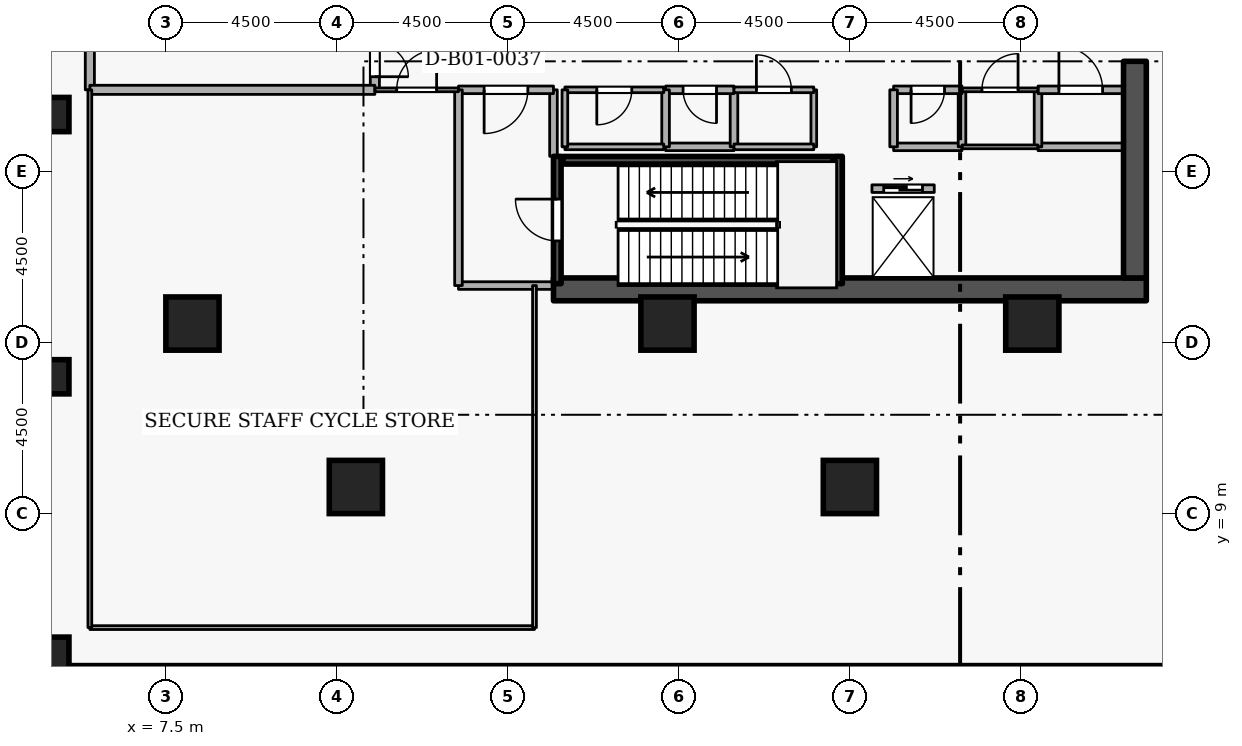
"""IFC4 building model, lengths in metres.
Left out: names, types, materials, properties, quantities, classifications, styles, units other than length and angle.
Written with IfcOpenShell. Run it as: python <this file> out.ifc"""

import sys

from ifc_helpers import new_model, si_unit, direction, frame, frame_2d, origin, origin_2d, place, context, subcontext, project, spatial, rectangle, extrude, element, fill, save


model = new_model("IFC4")
c1 = context("Model", 3, precision=1e-05, world=origin(), true_north=direction((0.0, 1.0)))
c2 = subcontext(c1, "Body", "Model", "MODEL_VIEW")
j1 = project(units=[si_unit("LENGTHUNIT", "METRE"), si_unit("PLANEANGLEUNIT", "RADIAN")], contexts=[c1])
p1 = place(None, origin())
s1 = spatial("IfcSite", under=j1, at=p1, CompositionType="ELEMENT")
p2 = place(p1, origin())
s2 = spatial("IfcBuilding", under=s1, at=p2, CompositionType="ELEMENT")
p3 = place(p2, frame((0.0, 0.0, -5.4)))
s3 = spatial("IfcBuildingStorey", under=s2, at=p3, CompositionType="ELEMENT", Elevation=-5.4)
p4 = place(p3, frame((17.7, 14.9, -0.6), z_axis=(0.0, 0.0, 1.0), x_axis=(1.0, 0.0, 0.0)))
e1 = element("IfcWall", 1, at=p4, inside=s3, PredefinedType="SHEAR", context=c2, shape_type="SweptSolid", body=[
    extrude(rectangle(XDim=15.6, YDim=0.6, at=frame_2d((7.8, 0.0))), origin(), (0.0, 0.0, 1.0), 6.0),
])
p5 = place(p3, frame((33.0, 15.2, -0.6), z_axis=(0.0, 0.0, 1.0), x_axis=(0.0, 1.0, 0.0)))
e2 = element("IfcWall", 2, at=p5, inside=s3, PredefinedType="SHEAR", context=c2, shape_type="SweptSolid", body=[
    extrude(rectangle(XDim=5.7, YDim=0.6, at=frame_2d((2.85, 0.0))), origin(), (0.0, 0.0, 1.0), 6.0),
])
for number, where, z_axis, x_axis in (
    (3, (12.5, 9.7, -0.6), (0.0, 0.0, 1.0), (1.0, 0.0, 0.0)),
    (4, (25.5, 9.7, -0.6), (0.0, 0.0, 1.0), (1.0, 0.0, 0.0)),
    (5, (8.2, 14.0, -0.6), (0.0, 0.0, 1.0), (1.0, 0.0, 0.0)),
    (6, (20.7, 14.0, -0.6), (0.0, 0.0, 1.0), (1.0, 0.0, 0.0)),
    (7, (30.3, 14.0, -0.6), (0.0, 0.0, 1.0), (1.0, 0.0, 0.0)),
):
    element("IfcColumn", number, at=place(p3, frame(where, z_axis=z_axis, x_axis=x_axis)), inside=s3, PredefinedType="COLUMN", context=c2, shape_type="SweptSolid", body=[
        extrude(rectangle(XDim=1.4, YDim=1.4, at=origin_2d()), origin(), (0.0, 0.0, 1.0), 6.0),
    ])
for number, where, z_axis, x_axis in (
    (8, (4.5, 5.3, -0.6), (0.0, 0.0, 1.0), (1.0, 0.0, 0.0)),
    (9, (4.5, 12.6, -0.6), (0.0, 0.0, 1.0), (1.0, 0.0, 0.0)),
    (10, (4.5, 19.5, -0.6), (0.0, 0.0, 1.0), (1.0, 0.0, 0.0)),
):
    element("IfcColumn", number, at=place(p3, frame(where, z_axis=z_axis, x_axis=x_axis)), inside=s3, PredefinedType="COLUMN", context=c2, shape_type="SweptSolid", body=[
        extrude(rectangle(XDim=0.9, YDim=0.9, at=origin_2d()), origin(), (0.0, 0.0, 1.0), 6.0),
    ])
p6 = place(p3, frame((26.08, 17.55, 0.0), z_axis=(0.0, 0.0, 1.0), x_axis=(1.0, 0.0, 0.0)))
e11 = element("IfcWall", 11, at=p6, inside=s3, PredefinedType="STANDARD", context=c2, shape_type="SweptSolid", body=[
    extrude(rectangle(XDim=1.64, YDim=0.2, at=frame_2d((0.82, 0.0))), origin(), (0.0, 0.0, 1.0), 5.06),
])
p7 = place(p6, frame((0.31, 0.0, 0.0)))
e12 = element("IfcOpeningElement", 12, at=p7, cuts=e11, PredefinedType="OPENING", context=c2, shape_type="SweptSolid", body=[
    extrude(rectangle(XDim=1.02, YDim=2.06, at=frame_2d((0.51, 1.03))), frame((0.0, 0.11, 0.0), z_axis=(0.0, -1.0, 0.0), x_axis=(1.0, 0.0, 0.0)), (0.0, 0.0, 1.0), 0.22),
])
p8 = place(p3, frame((17.8, 15.05, -0.6), z_axis=(0.0, 0.0, 1.0), x_axis=(0.0, 1.0, 0.0)))
e13 = element("IfcWall", 13, at=p8, inside=s3, PredefinedType="SHEAR", context=c2, shape_type="SweptSolid", body=[
    extrude(rectangle(XDim=3.35, YDim=0.2, at=frame_2d((1.675, 0.0))), origin(), (0.0, 0.0, 1.0), 6.0),
])
p9 = place(p8, frame((1.125, 0.0, 0.6)))
e14 = element("IfcOpeningElement", 14, at=p9, cuts=e13, PredefinedType="OPENING", context=c2, shape_type="SweptSolid", body=[
    extrude(rectangle(XDim=1.1, YDim=2.1, at=frame_2d((0.55, 1.05))), frame((0.0, 0.11, 0.0), z_axis=(0.0, -1.0, 0.0), x_axis=(1.0, 0.0, 0.0)), (0.0, 0.0, 1.0), 0.22),
])
p10 = place(p3, frame((25.2, 18.4, -0.6), z_axis=(0.0, 0.0, 1.0), x_axis=(0.0, -1.0, 0.0)))
e15 = element("IfcWall", 15, at=p10, inside=s3, PredefinedType="SHEAR", context=c2, shape_type="SweptSolid", body=[
    extrude(rectangle(XDim=3.35, YDim=0.2, at=frame_2d((1.675, 0.0))), origin(), (0.0, 0.0, 1.0), 6.0),
])
p11 = place(p3, frame((25.05, 18.297, -0.6), z_axis=(0.0, 0.0, 1.0), x_axis=(-1.0, 0.0, 0.0)))
e16 = element("IfcWall", 16, at=p11, inside=s3, PredefinedType="SHEAR", context=c2, shape_type="SweptSolid", body=[
    extrude(rectangle(XDim=7.1, YDim=0.2, at=frame_2d((3.55, 0.0))), origin(), (0.0, 0.0, 1.0), 6.0),
])
p12 = place(p3, frame((15.2, 15.0, 0.0), z_axis=(0.0, 0.0, 1.0), x_axis=(1.0, 0.0, 0.0)))
e17 = element("IfcWall", 17, at=p12, inside=s3, PredefinedType="STANDARD", context=c2, shape_type="SweptSolid", body=[
    extrude(rectangle(XDim=2.5, YDim=0.2, at=frame_2d((1.25, 0.0))), origin(), (0.0, 0.0, 1.0), 5.06),
])
p13 = place(p3, frame((17.7, 18.4, 0.0), z_axis=(0.0, 0.0, 1.0), x_axis=(0.0, 1.0, 0.0)))
e18 = element("IfcWall", 18, at=p13, inside=s3, PredefinedType="STANDARD", context=c2, shape_type="SweptSolid", body=[
    extrude(rectangle(XDim=1.75, YDim=0.2, at=frame_2d((0.875, 0.0))), origin(), (0.0, 0.0, 1.0), 4.265),
])
p14 = place(p3, frame((17.7, 20.15, 0.0), z_axis=(0.0, 0.0, 1.0), x_axis=(-1.0, 0.0, 0.0)))
e19 = element("IfcWall", 19, at=p14, inside=s3, PredefinedType="STANDARD", context=c2, shape_type="SweptSolid", body=[
    extrude(rectangle(XDim=2.5, YDim=0.2, at=frame_2d((1.25, 0.0))), origin(), (0.0, 0.0, 1.0), 5.06),
])
p15 = place(p14, frame((0.675, 0.0, 0.0)))
e20 = element("IfcOpeningElement", 20, at=p15, cuts=e19, PredefinedType="OPENING", context=c2, shape_type="SweptSolid", body=[
    extrude(rectangle(XDim=1.15, YDim=2.1, at=frame_2d((0.575, 1.05))), frame((0.0, 0.11, 0.0), z_axis=(0.0, -1.0, 0.0), x_axis=(1.0, 0.0, 0.0)), (0.0, 0.0, 1.0), 0.22),
])
p16 = place(p3, frame((15.2, 20.15, 0.0), z_axis=(0.0, 0.0, 1.0), x_axis=(0.0, -1.0, 0.0)))
e21 = element("IfcWall", 21, at=p16, inside=s3, PredefinedType="STANDARD", context=c2, shape_type="SweptSolid", body=[
    extrude(rectangle(XDim=5.15, YDim=0.2, at=frame_2d((2.575, 0.0))), origin(), (0.0, 0.0, 1.0), 5.06),
])
p17 = place(p3, frame((26.65, 18.65, 0.0), z_axis=(0.0, 0.0, 1.0), x_axis=(1.0, 0.0, 0.0)))
e22 = element("IfcWall", 22, at=p17, inside=s3, PredefinedType="STANDARD", context=c2, shape_type="SweptSolid", body=[
    extrude(rectangle(XDim=1.8, YDim=0.2, at=frame_2d((0.9, 0.0))), origin(), (0.0, 0.0, 1.0), 5.06),
])
p18 = place(p3, frame((28.45, 18.65, 0.0), z_axis=(0.0, 0.0, 1.0), x_axis=(0.0, 1.0, 0.0)))
e23 = element("IfcWall", 23, at=p18, inside=s3, PredefinedType="STANDARD", context=c2, shape_type="SweptSolid", body=[
    extrude(rectangle(XDim=1.5, YDim=0.2, at=frame_2d((0.75, 0.0))), origin(), (0.0, 0.0, 1.0), 5.06),
])
p19 = place(p3, frame((28.45, 20.15, 0.0), z_axis=(0.0, 0.0, 1.0), x_axis=(-1.0, 0.0, 0.0)))
e24 = element("IfcWall", 24, at=p19, inside=s3, PredefinedType="STANDARD", context=c2, shape_type="SweptSolid", body=[
    extrude(rectangle(XDim=1.8, YDim=0.2, at=frame_2d((0.9, 0.0))), origin(), (0.0, 0.0, 1.0), 5.06),
])
p20 = place(p19, frame((0.46, 0.0, 0.0)))
e25 = element("IfcOpeningElement", 25, at=p20, cuts=e24, PredefinedType="OPENING", context=c2, shape_type="SweptSolid", body=[
    extrude(rectangle(XDim=0.88, YDim=2.04, at=frame_2d((0.44, 1.02))), frame((0.0, 0.11, 0.0), z_axis=(0.0, -1.0, 0.0), x_axis=(1.0, 0.0, 0.0)), (0.0, 0.0, 1.0), 0.22),
])
p21 = place(p3, frame((26.65, 20.15, 0.0), z_axis=(0.0, 0.0, 1.0), x_axis=(0.0, -1.0, 0.0)))
e26 = element("IfcWall", 26, at=p21, inside=s3, PredefinedType="STANDARD", context=c2, shape_type="SweptSolid", body=[
    extrude(rectangle(XDim=1.5, YDim=0.2, at=frame_2d((0.75, 0.0))), origin(), (0.0, 0.0, 1.0), 5.06),
])
p22 = place(p3, frame((20.65, 18.65, 0.0), z_axis=(0.0, 0.0, 1.0), x_axis=(1.0, 0.0, 0.0)))
e27 = element("IfcWall", 27, at=p22, inside=s3, PredefinedType="STANDARD", context=c2, shape_type="SweptSolid", body=[
    extrude(rectangle(XDim=1.8, YDim=0.2, at=frame_2d((0.9, 0.0))), origin(), (0.0, 0.0, 1.0), 5.06),
])
p23 = place(p3, frame((22.45, 18.65, 0.0), z_axis=(0.0, 0.0, 1.0), x_axis=(0.0, 1.0, 0.0)))
e28 = element("IfcWall", 28, at=p23, inside=s3, PredefinedType="STANDARD", context=c2, shape_type="SweptSolid", body=[
    extrude(rectangle(XDim=1.5, YDim=0.2, at=frame_2d((0.75, 0.0))), origin(), (0.0, 0.0, 1.0), 5.06),
])
p24 = place(p3, frame((22.45, 20.15, 0.0), z_axis=(0.0, 0.0, 1.0), x_axis=(-1.0, 0.0, 0.0)))
e29 = element("IfcWall", 29, at=p24, inside=s3, PredefinedType="STANDARD", context=c2, shape_type="SweptSolid", body=[
    extrude(rectangle(XDim=1.8, YDim=0.2, at=frame_2d((0.9, 0.0))), origin(), (0.0, 0.0, 1.0), 5.06),
])
p25 = place(p24, frame((0.46, 0.0, 0.0)))
e30 = element("IfcOpeningElement", 30, at=p25, cuts=e29, PredefinedType="OPENING", context=c2, shape_type="SweptSolid", body=[
    extrude(rectangle(XDim=0.88, YDim=2.04, at=frame_2d((0.44, 1.02))), frame((0.0, 0.11, 0.0), z_axis=(0.0, -1.0, 0.0), x_axis=(1.0, 0.0, 0.0)), (0.0, 0.0, 1.0), 0.22),
])
p26 = place(p3, frame((20.65, 20.15, 0.0), z_axis=(0.0, 0.0, 1.0), x_axis=(0.0, -1.0, 0.0)))
e31 = element("IfcWall", 31, at=p26, inside=s3, PredefinedType="STANDARD", context=c2, shape_type="SweptSolid", body=[
    extrude(rectangle(XDim=1.5, YDim=0.2, at=frame_2d((0.75, 0.0))), origin(), (0.0, 0.0, 1.0), 5.06),
])
p27 = place(p3, frame((32.7, 18.65, 0.0), z_axis=(0.0, 0.0, 1.0), x_axis=(-1.0, 0.0, 0.0)))
e32 = element("IfcWall", 32, at=p27, inside=s3, PredefinedType="STANDARD", context=c2, shape_type="SweptSolid", body=[
    extrude(rectangle(XDim=2.25, YDim=0.2, at=frame_2d((1.125, 0.0))), origin(), (0.0, 0.0, 1.0), 5.06),
])
p28 = place(p3, frame((30.45, 18.65, 0.0), z_axis=(0.0, 0.0, 1.0), x_axis=(0.0, 1.0, 0.0)))
e33 = element("IfcWall", 33, at=p28, inside=s3, PredefinedType="STANDARD", context=c2, shape_type="SweptSolid", body=[
    extrude(rectangle(XDim=1.5, YDim=0.2, at=frame_2d((0.75, 0.0))), origin(), (0.0, 0.0, 1.0), 5.06),
])
p29 = place(p3, frame((30.45, 20.15, 0.0), z_axis=(0.0, 0.0, 1.0), x_axis=(1.0, 0.0, 0.0)))
e34 = element("IfcWall", 34, at=p29, inside=s3, PredefinedType="STANDARD", context=c2, shape_type="SweptSolid", body=[
    extrude(rectangle(XDim=2.25, YDim=0.2, at=frame_2d((1.125, 0.0))), origin(), (0.0, 0.0, 1.0), 5.06),
])
p30 = place(p29, frame((0.55, 0.0, 0.0)))
e35 = element("IfcOpeningElement", 35, at=p30, cuts=e34, PredefinedType="OPENING", context=c2, shape_type="SweptSolid", body=[
    extrude(rectangle(XDim=1.15, YDim=2.1, at=frame_2d((0.575, 1.05))), frame((0.0, 0.11, 0.0), z_axis=(0.0, -1.0, 0.0), x_axis=(1.0, 0.0, 0.0)), (0.0, 0.0, 1.0), 0.22),
])
p31 = place(p3, frame((5.5, 20.15, 0.0), z_axis=(0.0, 0.0, 1.0), x_axis=(0.0, 1.0, 0.0)))
e36 = element("IfcWall", 36, at=p31, inside=s3, PredefinedType="STANDARD", context=c2, shape_type="SweptSolid", body=[
    extrude(rectangle(XDim=26.85, YDim=0.24, at=frame_2d((13.425, 0.0))), origin(), (0.0, 0.0, 1.0), 5.06),
])
p32 = place(p3, frame((13.0, 21.72, 0.0), z_axis=(0.0, 0.0, 1.0), x_axis=(0.0, -1.0, 0.0)))
e37 = element("IfcWall", 37, at=p32, inside=s3, PredefinedType="STANDARD", context=c2, shape_type="SweptSolid", body=[
    extrude(rectangle(XDim=1.57, YDim=0.24, at=frame_2d((0.785, 0.0))), origin(), (0.0, 0.0, 1.0), 5.06),
])
p33 = place(p32, frame((0.345, 0.0, 0.0)))
e38 = element("IfcOpeningElement", 38, at=p33, cuts=e37, PredefinedType="OPENING", context=c2, shape_type="SweptSolid", body=[
    extrude(rectangle(XDim=0.88, YDim=2.04, at=frame_2d((0.44, 1.02))), frame((0.0, 0.13, 0.0), z_axis=(0.0, -1.0, 0.0), x_axis=(1.0, 0.0, 0.0)), (0.0, 0.0, 1.0), 0.26),
])
p34 = place(p3, frame((13.0, 20.15, 0.0), z_axis=(0.0, 0.0, 1.0), x_axis=(-1.0, 0.0, 0.0)))
e39 = element("IfcWall", 39, at=p34, inside=s3, PredefinedType="STANDARD", context=c2, shape_type="SweptSolid", body=[
    extrude(rectangle(XDim=7.5, YDim=0.24, at=frame_2d((3.75, 0.0))), origin(), (0.0, 0.0, 1.0), 5.06),
])
p35 = place(p3, frame((18.0, 18.65, 0.0), z_axis=(0.0, 0.0, 1.0), x_axis=(1.0, 0.0, 0.0)))
e40 = element("IfcWall", 40, at=p35, inside=s3, PredefinedType="PARTITIONING", context=c2, shape_type="SweptSolid", body=[
    extrude(rectangle(XDim=2.6, YDim=0.15, at=frame_2d((1.3, 0.0))), origin(), (0.0, 0.0, 1.0), 5.06),
])
p36 = place(p3, frame((20.6, 20.15, 0.0), z_axis=(0.0, 0.0, 1.0), x_axis=(-1.0, 0.0, 0.0)))
e41 = element("IfcWall", 41, at=p36, inside=s3, PredefinedType="PARTITIONING", context=c2, shape_type="SweptSolid", body=[
    extrude(rectangle(XDim=2.6, YDim=0.15, at=frame_2d((1.3, 0.0))), origin(), (0.0, 0.0, 1.0), 5.06),
])
p37 = place(p36, frame((0.84, 0.0, 0.0)))
e42 = element("IfcOpeningElement", 42, at=p37, cuts=e41, PredefinedType="OPENING", context=c2, shape_type="SweptSolid", body=[
    extrude(rectangle(XDim=0.92, YDim=2.08, at=frame_2d((0.46, 1.04))), frame((0.0, 0.085, 0.0), z_axis=(0.0, -1.0, 0.0), x_axis=(1.0, 0.0, 0.0)), (0.0, 0.0, 1.0), 0.17),
])
p38 = place(p3, frame((18.0, 20.15, 0.0), z_axis=(0.0, 0.0, 1.0), x_axis=(0.0, -1.0, 0.0)))
e43 = element("IfcWall", 43, at=p38, inside=s3, PredefinedType="PARTITIONING", context=c2, shape_type="SweptSolid", body=[
    extrude(rectangle(XDim=1.5, YDim=0.15, at=frame_2d((0.75, 0.0))), origin(), (0.0, 0.0, 1.0), 4.265),
])
p39 = place(p3, frame((24.55, 20.15, 0.0), z_axis=(0.0, 0.0, 1.0), x_axis=(0.0, -1.0, 0.0)))
e44 = element("IfcWall", 44, at=p39, inside=s3, PredefinedType="PARTITIONING", context=c2, shape_type="SweptSolid", body=[
    extrude(rectangle(XDim=1.5, YDim=0.15, at=frame_2d((0.75, 0.0))), origin(), (0.0, 0.0, 1.0), 5.06),
])
p40 = place(p3, frame((24.55, 18.65, 0.0), z_axis=(0.0, 0.0, 1.0), x_axis=(-1.0, 0.0, 0.0)))
e45 = element("IfcWall", 45, at=p40, inside=s3, PredefinedType="PARTITIONING", context=c2, shape_type="SweptSolid", body=[
    extrude(rectangle(XDim=2.1, YDim=0.15, at=frame_2d((1.05, 0.0))), origin(), (0.0, 0.0, 1.0), 5.06),
])
p41 = place(p3, frame((22.45, 20.15, 0.0), z_axis=(0.0, 0.0, 1.0), x_axis=(1.0, 0.0, 0.0)))
e46 = element("IfcWall", 46, at=p41, inside=s3, PredefinedType="PARTITIONING", context=c2, shape_type="SweptSolid", body=[
    extrude(rectangle(XDim=2.1, YDim=0.15, at=frame_2d((1.05, 0.0))), origin(), (0.0, 0.0, 1.0), 5.06),
])
p42 = place(p41, frame((0.59, 0.0, 0.0)))
e47 = element("IfcOpeningElement", 47, at=p42, cuts=e46, PredefinedType="OPENING", context=c2, shape_type="SweptSolid", body=[
    extrude(rectangle(XDim=0.92, YDim=2.08, at=frame_2d((0.46, 1.04))), frame((0.0, 0.085, 0.0), z_axis=(0.0, -1.0, 0.0), x_axis=(1.0, 0.0, 0.0)), (0.0, 0.0, 1.0), 0.17),
])
p43 = place(p3, frame((30.45, 18.65, 0.0), z_axis=(0.0, 0.0, 1.0), x_axis=(-1.0, 0.0, 0.0)))
e48 = element("IfcWall", 48, at=p43, inside=s3, PredefinedType="PARTITIONING", context=c2, shape_type="SweptSolid", body=[
    extrude(rectangle(XDim=2.0, YDim=0.1, at=frame_2d((1.0, 0.0))), origin(), (0.0, 0.0, 1.0), 5.06),
])
p44 = place(p3, frame((28.45, 20.15, 0.0), z_axis=(0.0, 0.0, 1.0), x_axis=(1.0, 0.0, 0.0)))
e49 = element("IfcWall", 49, at=p44, inside=s3, PredefinedType="PARTITIONING", context=c2, shape_type="SweptSolid", body=[
    extrude(rectangle(XDim=2.0, YDim=0.1, at=frame_2d((1.0, 0.0))), origin(), (0.0, 0.0, 1.0), 5.06),
])
p45 = place(p44, frame((0.525, 0.0, 0.0)))
e50 = element("IfcOpeningElement", 50, at=p45, cuts=e49, PredefinedType="OPENING", context=c2, shape_type="SweptSolid", body=[
    extrude(rectangle(XDim=0.95, YDim=2.1, at=frame_2d((0.475, 1.05))), frame((0.0, 0.06, 0.0), z_axis=(0.0, -1.0, 0.0), x_axis=(1.0, 0.0, 0.0)), (0.0, 0.0, 1.0), 0.12),
])
p46 = place(p3, frame((17.2, 6.0, 0.0), z_axis=(0.0, 0.0, 1.0), x_axis=(-1.0, 0.0, 0.0)))
e51 = element("IfcWall", 51, at=p46, inside=s3, PredefinedType="PARTITIONING", context=c2, shape_type="SweptSolid", body=[
    extrude(rectangle(XDim=11.7, YDim=0.1, at=frame_2d((5.85, 0.0))), origin(), (0.0, 0.0, 1.0), 5.06),
])
p47 = place(p3, frame((5.5, 6.0, 0.0), z_axis=(0.0, 0.0, 1.0), x_axis=(0.0, 1.0, 0.0)))
e52 = element("IfcWall", 52, at=p47, inside=s3, PredefinedType="PARTITIONING", context=c2, shape_type="SweptSolid", body=[
    extrude(rectangle(XDim=14.15, YDim=0.1, at=frame_2d((7.075, 0.0))), origin(), (0.0, 0.0, 1.0), 5.06),
])
p48 = place(p3, frame((13.0, 20.15, 0.0), z_axis=(0.0, 0.0, 1.0), x_axis=(1.0, 0.0, 0.0)))
e53 = element("IfcWall", 53, at=p48, inside=s3, PredefinedType="PARTITIONING", context=c2, shape_type="SweptSolid", body=[
    extrude(rectangle(XDim=2.2, YDim=0.1, at=frame_2d((1.1, 0.0))), origin(), (0.0, 0.0, 1.0), 5.06),
])
p49 = place(p48, frame((0.575, 0.0, 0.0)))
e54 = element("IfcOpeningElement", 54, at=p49, cuts=e53, PredefinedType="OPENING", context=c2, shape_type="SweptSolid", body=[
    extrude(rectangle(XDim=1.05, YDim=2.1, at=frame_2d((0.525, 1.05))), frame((0.0, 0.06, 0.0), z_axis=(0.0, -1.0, 0.0), x_axis=(1.0, 0.0, 0.0)), (0.0, 0.0, 1.0), 0.12),
])
p50 = place(p3, frame((17.2, 15.0, 0.0), z_axis=(0.0, 0.0, 1.0), x_axis=(0.0, -1.0, 0.0)))
e55 = element("IfcWall", 55, at=p50, inside=s3, PredefinedType="PARTITIONING", context=c2, shape_type="SweptSolid", body=[
    extrude(rectangle(XDim=9.0, YDim=0.1, at=frame_2d((4.5, 0.0))), origin(), (0.0, 0.0, 1.0), 5.06),
])
p51 = place(p7, origin())
e56 = element("IfcDoor", 56, at=p51, inside=s3, OperationType="SLIDING_TO_LEFT", PredefinedType="DOOR", context=c2, shape_type="SweptSolid", body=[
    extrude(rectangle(XDim=1.02, YDim=2.06, at=frame_2d((0.51, 1.03))), frame((0.0, 0.025, 0.0), z_axis=(0.0, -1.0, 0.0), x_axis=(1.0, 0.0, 0.0)), (0.0, 0.0, 1.0), 0.05),
])
fill(e12, e56)
p52 = place(p9, origin())
e57 = element("IfcDoor", 57, at=p52, inside=s3, OperationType="SINGLE_SWING_RIGHT", PredefinedType="DOOR", context=c2, shape_type="SweptSolid", body=[
    extrude(rectangle(XDim=1.1, YDim=2.1, at=frame_2d((0.55, 1.05))), frame((0.0, 0.025, 0.0), z_axis=(0.0, -1.0, 0.0), x_axis=(1.0, 0.0, 0.0)), (0.0, 0.0, 1.0), 0.05),
])
fill(e14, e57)
p53 = place(p15, origin())
e58 = element("IfcDoor", 58, at=p53, inside=s3, OperationType="SINGLE_SWING_RIGHT", PredefinedType="DOOR", context=c2, shape_type="SweptSolid", body=[
    extrude(rectangle(XDim=1.15, YDim=2.1, at=frame_2d((0.575, 1.05))), frame((0.0, 0.025, 0.0), z_axis=(0.0, -1.0, 0.0), x_axis=(1.0, 0.0, 0.0)), (0.0, 0.0, 1.0), 0.05),
])
fill(e20, e58)
p54 = place(p20, origin())
e59 = element("IfcDoor", 59, at=p54, inside=s3, OperationType="SINGLE_SWING_RIGHT", PredefinedType="DOOR", context=c2, shape_type="SweptSolid", body=[
    extrude(rectangle(XDim=0.88, YDim=2.04, at=frame_2d((0.44, 1.02))), frame((0.0, 0.025, 0.0), z_axis=(0.0, -1.0, 0.0), x_axis=(1.0, 0.0, 0.0)), (0.0, 0.0, 1.0), 0.05),
])
fill(e25, e59)
p55 = place(p25, origin())
e60 = element("IfcDoor", 60, at=p55, inside=s3, OperationType="SINGLE_SWING_LEFT", PredefinedType="DOOR", context=c2, shape_type="SweptSolid", body=[
    extrude(rectangle(XDim=0.88, YDim=2.04, at=frame_2d((0.44, 1.02))), frame((0.0, 0.025, 0.0), z_axis=(0.0, -1.0, 0.0), x_axis=(1.0, 0.0, 0.0)), (0.0, 0.0, 1.0), 0.05),
])
fill(e30, e60)
p56 = place(p37, origin())
e61 = element("IfcDoor", 61, at=p56, inside=s3, OperationType="SINGLE_SWING_RIGHT", PredefinedType="DOOR", context=c2, shape_type="SweptSolid", body=[
    extrude(rectangle(XDim=0.92, YDim=2.08, at=frame_2d((0.46, 1.04))), frame((0.0, 0.025, 0.0), z_axis=(0.0, -1.0, 0.0), x_axis=(1.0, 0.0, 0.0)), (0.0, 0.0, 1.0), 0.05),
])
fill(e42, e61)
p57 = place(p42, origin())
e62 = element("IfcDoor", 62, at=p57, inside=s3, OperationType="SINGLE_SWING_LEFT", PredefinedType="DOOR", context=c2, shape_type="SweptSolid", body=[
    extrude(rectangle(XDim=0.92, YDim=2.08, at=frame_2d((0.46, 1.04))), frame((0.0, 0.025, 0.0), z_axis=(0.0, -1.0, 0.0), x_axis=(1.0, 0.0, 0.0)), (0.0, 0.0, 1.0), 0.05),
])
fill(e47, e62)
p58 = place(p45, origin())
e63 = element("IfcDoor", 63, at=p58, inside=s3, OperationType="SINGLE_SWING_RIGHT", PredefinedType="DOOR", context=c2, shape_type="SweptSolid", body=[
    extrude(rectangle(XDim=0.95, YDim=2.1, at=frame_2d((0.475, 1.05))), frame((0.0, 0.025, 0.0), z_axis=(0.0, -1.0, 0.0), x_axis=(1.0, 0.0, 0.0)), (0.0, 0.0, 1.0), 0.05),
])
fill(e50, e63)
p59 = place(p30, origin())
e64 = element("IfcDoor", 64, at=p59, inside=s3, OperationType="SINGLE_SWING_LEFT", PredefinedType="DOOR", context=c2, shape_type="SweptSolid", body=[
    extrude(rectangle(XDim=1.15, YDim=2.1, at=frame_2d((0.575, 1.05))), frame((0.0, 0.025, 0.0), z_axis=(0.0, -1.0, 0.0), x_axis=(1.0, 0.0, 0.0)), (0.0, 0.0, 1.0), 0.05),
])
fill(e35, e64)
p60 = place(p49, origin())
e65 = element("IfcDoor", 65, at=p60, inside=s3, OperationType="SINGLE_SWING_RIGHT", PredefinedType="DOOR", context=c2, shape_type="SweptSolid", body=[
    extrude(rectangle(XDim=1.05, YDim=2.1, at=frame_2d((0.525, 1.05))), frame((0.0, 0.025, 0.0), z_axis=(0.0, -1.0, 0.0), x_axis=(1.0, 0.0, 0.0)), (0.0, 0.0, 1.0), 0.05),
])
fill(e54, e65)
p61 = place(p33, origin())
e66 = element("IfcDoor", 66, at=p61, inside=s3, OperationType="SINGLE_SWING_RIGHT", PredefinedType="DOOR", context=c2, shape_type="SweptSolid", body=[
    extrude(rectangle(XDim=0.88, YDim=2.04, at=frame_2d((0.44, 1.02))), frame((0.0, 0.025, 0.0), z_axis=(0.0, -1.0, 0.0), x_axis=(1.0, 0.0, 0.0)), (0.0, 0.0, 1.0), 0.05),
])
fill(e38, e66)
save(model, sys.argv[1])
